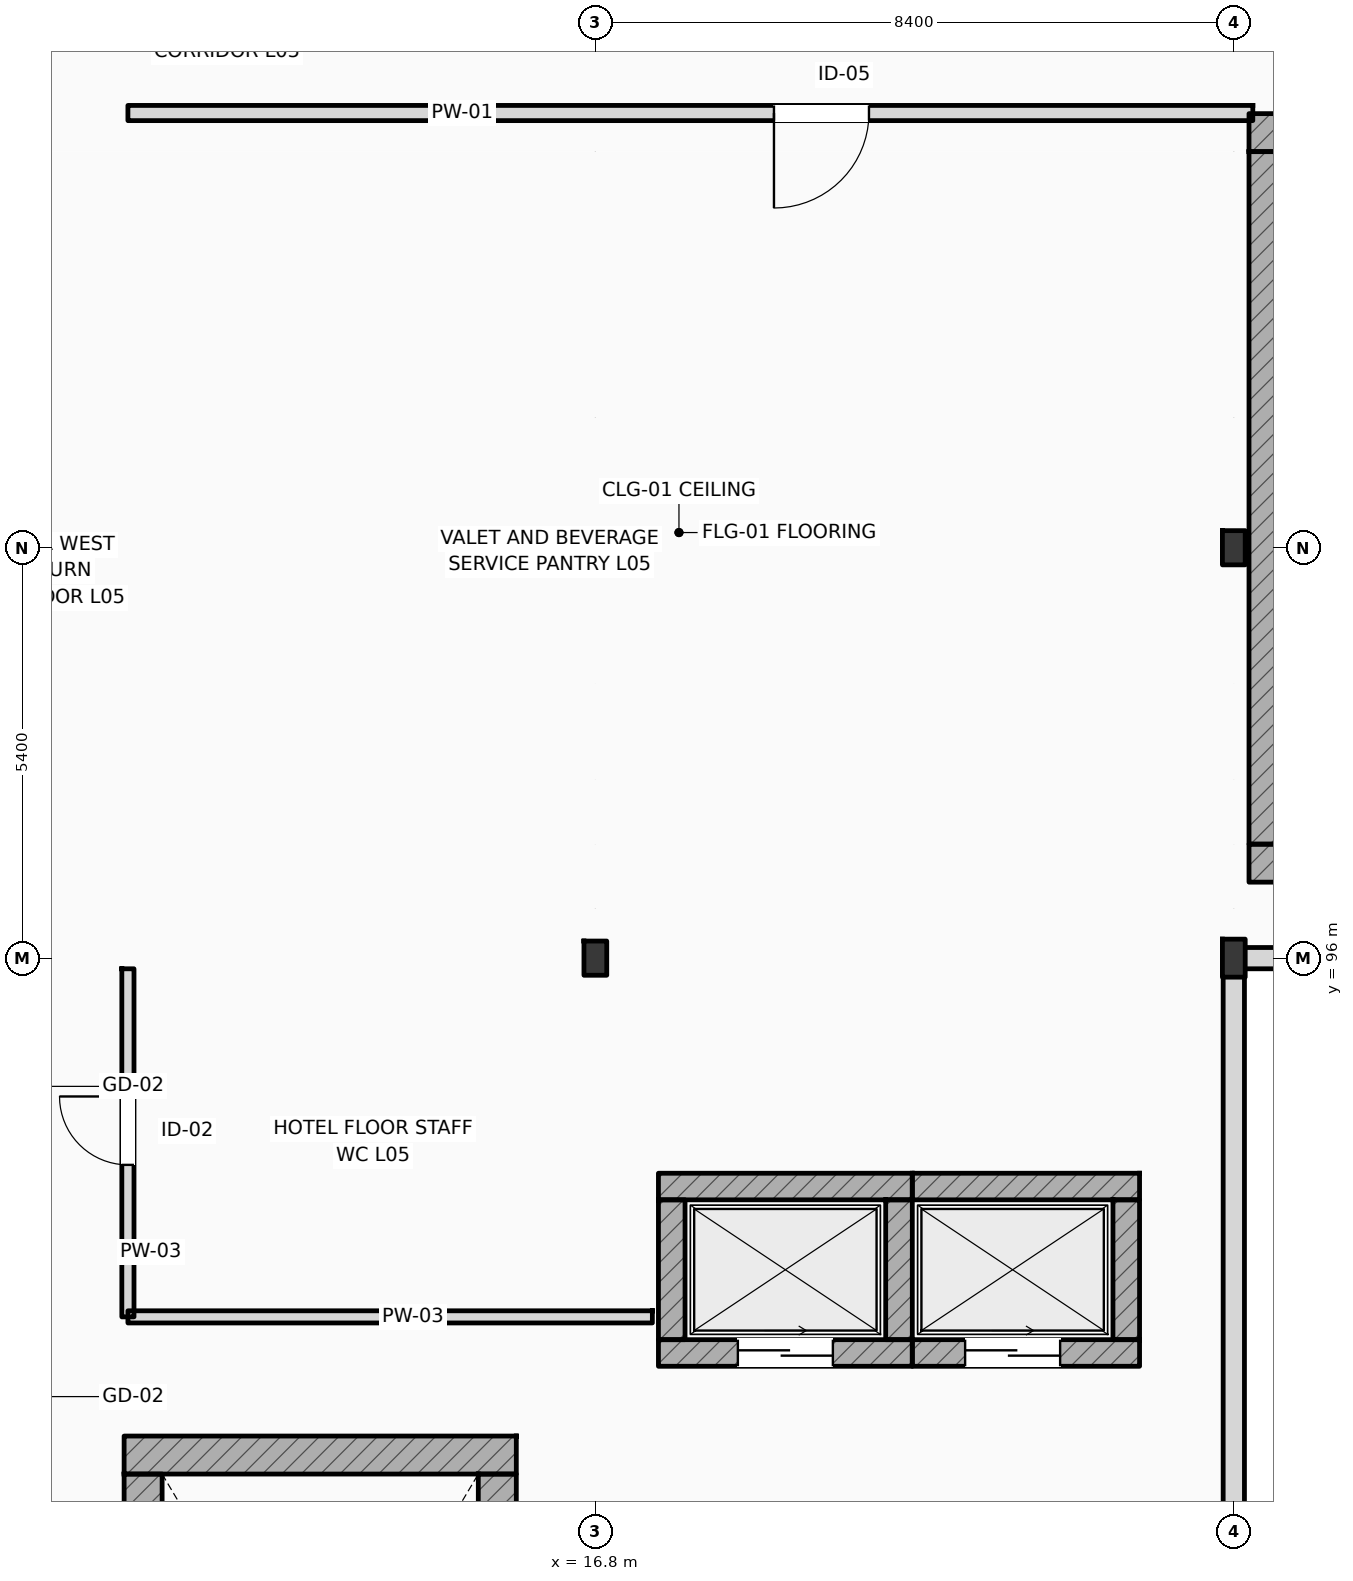
"""IFC4 building model, lengths in metres.
Left out: names, types, materials, properties, quantities, classifications, styles, units other than length and angle.
Written with IfcOpenShell. Run it as: python <this file> out.ifc"""

import sys

from ifc_helpers import new_model, si_unit, direction, frame, frame_2d, origin, origin_2d, place, context, subcontext, project, spatial, rectangle, i_section, extrude, element, fill, save


model = new_model("IFC4")
c1 = context("Model", 3, precision=1e-05, world=origin(), true_north=direction((0.0, 1.0)))
c2 = subcontext(c1, "Body", "Model", "MODEL_VIEW")
j1 = project(units=[si_unit("LENGTHUNIT", "METRE"), si_unit("PLANEANGLEUNIT", "RADIAN")], contexts=[c1])
p1 = place(None, origin())
s1 = spatial("IfcSite", under=j1, at=p1, CompositionType="ELEMENT")
p2 = place(p1, origin())
s2 = spatial("IfcBuilding", under=s1, at=p2, CompositionType="ELEMENT")
p3 = place(p2, frame((0.0, 0.0, 24.6)))
s3 = spatial("IfcBuildingStorey", under=s2, at=p3, CompositionType="ELEMENT", Elevation=24.6)
p4 = place(p3, frame((16.8, 96.0, 0.0), z_axis=(0.0, 0.0, 1.0), x_axis=(1.0, 0.0, 0.0)))
e1 = element("IfcColumn", 1, at=p4, inside=s3, PredefinedType="COLUMN", context=c2, shape_type="SweptSolid", body=[
    extrude(i_section(OverallWidth=0.3, OverallDepth=0.45, WebThickness=0.014, FlangeThickness=0.026, FilletRadius=0.027, at=origin_2d()), origin(), (0.0, 0.0, 1.0), 3.6),
])
p5 = place(p3, frame((25.2, 96.0, 0.0), z_axis=(0.0, 0.0, 1.0), x_axis=(1.0, 0.0, 0.0)))
e2 = element("IfcColumn", 2, at=p5, inside=s3, PredefinedType="COLUMN", context=c2, shape_type="SweptSolid", body=[
    extrude(i_section(OverallWidth=0.3, OverallDepth=0.5, WebThickness=0.014, FlangeThickness=0.028, FilletRadius=0.027, at=origin_2d()), origin(), (0.0, 0.0, 1.0), 3.6),
])
for number, where, z_axis, x_axis in (
    (3, (16.8, 101.4, 0.0), (0.0, 0.0, 1.0), (1.0, 0.0, 0.0)),
    (4, (25.2, 101.4, 0.0), (0.0, 0.0, 1.0), (1.0, 0.0, 0.0)),
):
    element("IfcColumn", number, at=place(p3, frame(where, z_axis=z_axis, x_axis=x_axis)), inside=s3, PredefinedType="COLUMN", context=c2, shape_type="SweptSolid", body=[
        extrude(i_section(OverallWidth=0.3, OverallDepth=0.45, WebThickness=0.014, FlangeThickness=0.026, FilletRadius=0.027, at=origin_2d()), origin(), (0.0, 0.0, 1.0), 3.6),
    ])
p6 = place(p3, frame((10.6, 89.462, 0.0), z_axis=(0.0, 0.0, 1.0), x_axis=(1.0, 0.0, 0.0)))
e5 = element("IfcWall", 5, at=p6, inside=s3, PredefinedType="SHEAR", context=c2, shape_type="SweptSolid", body=[
    extrude(rectangle(XDim=5.16, YDim=0.5, at=frame_2d((2.58, 0.0))), origin(), (0.0, 0.0, 1.0), 3.6),
])
p7 = place(p3, frame((10.85, 80.1, 0.0), z_axis=(0.0, 0.0, 1.0), x_axis=(0.0, 1.0, 0.0)))
e6 = element("IfcWall", 6, at=p7, inside=s3, PredefinedType="SHEAR", context=c2, shape_type="SweptSolid", body=[
    extrude(rectangle(XDim=9.112, YDim=0.5, at=frame_2d((4.556, 0.0))), origin(), (0.0, 0.0, 1.0), 3.6),
])
p8 = place(p3, frame((15.51, 80.1, 0.0), z_axis=(0.0, 0.0, 1.0), x_axis=(0.0, 1.0, 0.0)))
e7 = element("IfcWall", 7, at=p8, inside=s3, PredefinedType="SHEAR", context=c2, shape_type="SweptSolid", body=[
    extrude(rectangle(XDim=9.112, YDim=0.5, at=frame_2d((4.556, 0.0))), origin(), (0.0, 0.0, 1.0), 3.6),
])
p9 = place(p8, frame((0.44, 0.0, 0.0)))
e8 = element("IfcOpeningElement", 8, at=p9, cuts=e7, PredefinedType="OPENING", context=c2, shape_type="SweptSolid", body=[
    extrude(rectangle(XDim=1.1, YDim=2.2, at=frame_2d((0.55, 1.1))), frame((0.0, 0.26, 0.0), z_axis=(0.0, -1.0, 0.0), x_axis=(1.0, 0.0, 0.0)), (0.0, 0.0, 1.0), 0.52),
])
for number, where, z_axis, x_axis in (
    (9, (25.4, 106.862, 0.0), (0.0, 0.0, 1.0), (1.0, 0.0, 0.0)),
    (10, (25.4, 97.25, 0.0), (0.0, 0.0, 1.0), (1.0, 0.0, 0.0)),
):
    element("IfcWall", number, at=place(p3, frame(where, z_axis=z_axis, x_axis=x_axis)), inside=s3, PredefinedType="SHEAR", context=c2, shape_type="SweptSolid", body=[
        extrude(rectangle(XDim=5.16, YDim=0.5, at=frame_2d((2.58, 0.0))), origin(), (0.0, 0.0, 1.0), 3.6),
    ])
p10 = place(p3, frame((25.65, 97.5, 0.0), z_axis=(0.0, 0.0, 1.0), x_axis=(0.0, 1.0, 0.0)))
e11 = element("IfcWall", 11, at=p10, inside=s3, PredefinedType="SHEAR", context=c2, shape_type="SweptSolid", body=[
    extrude(rectangle(XDim=9.112, YDim=0.5, at=frame_2d((4.556, 0.0))), origin(), (0.0, 0.0, 1.0), 3.6),
])
p11 = place(p3, frame((25.2, 96.0, 0.0), z_axis=(0.0, 0.0, 1.0), x_axis=(1.0, 0.0, 0.0)))
e12 = element("IfcWall", 12, at=p11, inside=s3, PredefinedType="STANDARD", context=c2, shape_type="SweptSolid", body=[
    extrude(rectangle(XDim=94.8, YDim=0.28, at=frame_2d((47.4, 0.0))), origin(), (0.0, 0.0, 1.0), 2.78),
])
p12 = place(p11, frame((16.539, 0.0, 0.9)))
e13 = element("IfcOpeningElement", 13, at=p12, cuts=e12, PredefinedType="OPENING", context=c2, shape_type="SweptSolid", body=[
    extrude(rectangle(XDim=1.75, YDim=1.7, at=frame_2d((0.875, 0.85))), frame((0.0, 0.15, 0.0), z_axis=(0.0, -1.0, 0.0), x_axis=(1.0, 0.0, 0.0)), (0.0, 0.0, 1.0), 0.3),
])
p13 = place(p11, frame((20.367, 0.0, 0.9)))
e14 = element("IfcOpeningElement", 14, at=p13, cuts=e12, PredefinedType="OPENING", context=c2, shape_type="SweptSolid", body=[
    extrude(rectangle(XDim=2.0, YDim=1.7, at=frame_2d((1.0, 0.85))), frame((0.0, 0.15, 0.0), z_axis=(0.0, -1.0, 0.0), x_axis=(1.0, 0.0, 0.0)), (0.0, 0.0, 1.0), 0.3),
])
p14 = place(p11, frame((24.326, 0.0, 0.9)))
e15 = element("IfcOpeningElement", 15, at=p14, cuts=e12, PredefinedType="OPENING", context=c2, shape_type="SweptSolid", body=[
    extrude(rectangle(XDim=2.3, YDim=1.7, at=frame_2d((1.15, 0.85))), frame((0.0, 0.15, 0.0), z_axis=(0.0, -1.0, 0.0), x_axis=(1.0, 0.0, 0.0)), (0.0, 0.0, 1.0), 0.3),
])
p15 = place(p11, frame((27.684, 0.0, 0.9)))
e16 = element("IfcOpeningElement", 16, at=p15, cuts=e12, PredefinedType="OPENING", context=c2, shape_type="SweptSolid", body=[
    extrude(rectangle(XDim=2.6, YDim=1.7, at=frame_2d((1.3, 0.85))), frame((0.0, 0.15, 0.0), z_axis=(0.0, -1.0, 0.0), x_axis=(1.0, 0.0, 0.0)), (0.0, 0.0, 1.0), 0.3),
])
p16 = place(p11, frame((32.083, 0.0, 0.9)))
e17 = element("IfcOpeningElement", 17, at=p16, cuts=e12, PredefinedType="OPENING", context=c2, shape_type="SweptSolid", body=[
    extrude(rectangle(XDim=2.419, YDim=1.7, at=frame_2d((1.209, 0.85))), frame((0.0, 0.15, 0.0), z_axis=(0.0, -1.0, 0.0), x_axis=(1.0, 0.0, 0.0)), (0.0, 0.0, 1.0), 0.3),
])
p17 = place(p11, frame((35.322, 0.0, 0.9)))
e18 = element("IfcOpeningElement", 18, at=p17, cuts=e12, PredefinedType="OPENING", context=c2, shape_type="SweptSolid", body=[
    extrude(rectangle(XDim=2.868, YDim=1.7, at=frame_2d((1.434, 0.85))), frame((0.0, 0.15, 0.0), z_axis=(0.0, -1.0, 0.0), x_axis=(1.0, 0.0, 0.0)), (0.0, 0.0, 1.0), 0.3),
])
p18 = place(p11, frame((56.015, 0.0, 0.9)))
e19 = element("IfcOpeningElement", 19, at=p18, cuts=e12, PredefinedType="OPENING", context=c2, shape_type="SweptSolid", body=[
    extrude(rectangle(XDim=1.2, YDim=1.7, at=frame_2d((0.6, 0.85))), frame((0.0, 0.15, 0.0), z_axis=(0.0, -1.0, 0.0), x_axis=(1.0, 0.0, 0.0)), (0.0, 0.0, 1.0), 0.3),
])
p19 = place(p11, frame((59.888, 0.0, 0.9)))
e20 = element("IfcOpeningElement", 20, at=p19, cuts=e12, PredefinedType="OPENING", context=c2, shape_type="SweptSolid", body=[
    extrude(rectangle(XDim=1.35, YDim=1.7, at=frame_2d((0.675, 0.85))), frame((0.0, 0.15, 0.0), z_axis=(0.0, -1.0, 0.0), x_axis=(1.0, 0.0, 0.0)), (0.0, 0.0, 1.0), 0.3),
])
p20 = place(p11, frame((63.799, 0.0, 0.9)))
e21 = element("IfcOpeningElement", 21, at=p20, cuts=e12, PredefinedType="OPENING", context=c2, shape_type="SweptSolid", body=[
    extrude(rectangle(XDim=1.5, YDim=1.7, at=frame_2d((0.75, 0.85))), frame((0.0, 0.15, 0.0), z_axis=(0.0, -1.0, 0.0), x_axis=(1.0, 0.0, 0.0)), (0.0, 0.0, 1.0), 0.3),
])
p21 = place(p11, frame((67.709, 0.0, 0.9)))
e22 = element("IfcOpeningElement", 22, at=p21, cuts=e12, PredefinedType="OPENING", context=c2, shape_type="SweptSolid", body=[
    extrude(rectangle(XDim=1.65, YDim=1.7, at=frame_2d((0.825, 0.85))), frame((0.0, 0.15, 0.0), z_axis=(0.0, -1.0, 0.0), x_axis=(1.0, 0.0, 0.0)), (0.0, 0.0, 1.0), 0.3),
])
p22 = place(p11, frame((71.618, 0.0, 0.9)))
e23 = element("IfcOpeningElement", 23, at=p22, cuts=e12, PredefinedType="OPENING", context=c2, shape_type="SweptSolid", body=[
    extrude(rectangle(XDim=1.8, YDim=1.7, at=frame_2d((0.9, 0.85))), frame((0.0, 0.15, 0.0), z_axis=(0.0, -1.0, 0.0), x_axis=(1.0, 0.0, 0.0)), (0.0, 0.0, 1.0), 0.3),
])
p23 = place(p11, frame((75.129, 0.0, 0.9)))
e24 = element("IfcOpeningElement", 24, at=p23, cuts=e12, PredefinedType="OPENING", context=c2, shape_type="SweptSolid", body=[
    extrude(rectangle(XDim=1.95, YDim=1.7, at=frame_2d((0.975, 0.85))), frame((0.0, 0.15, 0.0), z_axis=(0.0, -1.0, 0.0), x_axis=(1.0, 0.0, 0.0)), (0.0, 0.0, 1.0), 0.3),
])
p24 = place(p11, frame((79.439, 0.0, 0.9)))
e25 = element("IfcOpeningElement", 25, at=p24, cuts=e12, PredefinedType="OPENING", context=c2, shape_type="SweptSolid", body=[
    extrude(rectangle(XDim=2.1, YDim=1.7, at=frame_2d((1.05, 0.85))), frame((0.0, 0.15, 0.0), z_axis=(0.0, -1.0, 0.0), x_axis=(1.0, 0.0, 0.0)), (0.0, 0.0, 1.0), 0.3),
])
p25 = place(p11, frame((83.349, 0.0, 0.9)))
e26 = element("IfcOpeningElement", 26, at=p25, cuts=e12, PredefinedType="OPENING", context=c2, shape_type="SweptSolid", body=[
    extrude(rectangle(XDim=2.25, YDim=1.7, at=frame_2d((1.125, 0.85))), frame((0.0, 0.15, 0.0), z_axis=(0.0, -1.0, 0.0), x_axis=(1.0, 0.0, 0.0)), (0.0, 0.0, 1.0), 0.3),
])
p26 = place(p11, frame((87.258, 0.0, 0.9)))
e27 = element("IfcOpeningElement", 27, at=p26, cuts=e12, PredefinedType="OPENING", context=c2, shape_type="SweptSolid", body=[
    extrude(rectangle(XDim=2.4, YDim=1.7, at=frame_2d((1.2, 0.85))), frame((0.0, 0.15, 0.0), z_axis=(0.0, -1.0, 0.0), x_axis=(1.0, 0.0, 0.0)), (0.0, 0.0, 1.0), 0.3),
])
p27 = place(p11, frame((91.204, 0.0, 0.9)))
e28 = element("IfcOpeningElement", 28, at=p27, cuts=e12, PredefinedType="OPENING", context=c2, shape_type="SweptSolid", body=[
    extrude(rectangle(XDim=2.55, YDim=1.7, at=frame_2d((1.275, 0.85))), frame((0.0, 0.15, 0.0), z_axis=(0.0, -1.0, 0.0), x_axis=(1.0, 0.0, 0.0)), (0.0, 0.0, 1.0), 0.3),
])
p28 = place(p3, frame((25.2, 79.5, 0.0), z_axis=(0.0, 0.0, 1.0), x_axis=(0.0, 1.0, 0.0)))
e29 = element("IfcWall", 29, at=p28, inside=s3, PredefinedType="STANDARD", context=c2, shape_type="SweptSolid", body=[
    extrude(rectangle(XDim=16.5, YDim=0.28, at=frame_2d((8.25, 0.0))), origin(), (0.0, 0.0, 1.0), 2.93),
])
p29 = place(p3, frame((17.63, 92.995, 0.0), z_axis=(0.0, 0.0, 1.0), x_axis=(1.0, 0.0, 0.0)))
e30 = element("IfcWall", 30, at=p29, inside=s3, PredefinedType="SHEAR", context=c2, shape_type="SweptSolid", body=[
    extrude(rectangle(XDim=3.34, YDim=0.35, at=frame_2d((1.67, 0.0))), origin(), (0.0, 0.0, 1.0), 3.34),
])
p30 = place(p3, frame((17.63, 90.805, 0.0), z_axis=(0.0, 0.0, 1.0), x_axis=(1.0, 0.0, 0.0)))
e31 = element("IfcWall", 31, at=p30, inside=s3, PredefinedType="SHEAR", context=c2, shape_type="SweptSolid", body=[
    extrude(rectangle(XDim=3.34, YDim=0.35, at=frame_2d((1.67, 0.0))), origin(), (0.0, 0.0, 1.0), 3.34),
])
p31 = place(p30, frame((1.045, 0.0, 0.0)))
e32 = element("IfcOpeningElement", 32, at=p31, cuts=e31, PredefinedType="OPENING", context=c2, shape_type="SweptSolid", body=[
    extrude(rectangle(XDim=1.25, YDim=2.25, at=frame_2d((0.625, 1.125))), frame((0.0, 0.185, 0.0), z_axis=(0.0, -1.0, 0.0), x_axis=(1.0, 0.0, 0.0)), (0.0, 0.0, 1.0), 0.37),
])
for number, where, z_axis, x_axis in (
    (33, (17.805, 90.98, 0.0), (0.0, 0.0, 1.0), (0.0, 1.0, 0.0)),
    (34, (20.795, 90.98, 0.0), (0.0, 0.0, 1.0), (0.0, 1.0, 0.0)),
):
    element("IfcWall", number, at=place(p3, frame(where, z_axis=z_axis, x_axis=x_axis)), inside=s3, PredefinedType="SHEAR", context=c2, shape_type="SweptSolid", body=[
        extrude(rectangle(XDim=1.84, YDim=0.35, at=frame_2d((0.92, 0.0))), origin(), (0.0, 0.0, 1.0), 3.34),
    ])
p32 = place(p3, frame((20.97, 92.995, 0.0), z_axis=(0.0, 0.0, 1.0), x_axis=(1.0, 0.0, 0.0)))
e35 = element("IfcWall", 35, at=p32, inside=s3, PredefinedType="SHEAR", context=c2, shape_type="SweptSolid", body=[
    extrude(rectangle(XDim=2.99, YDim=0.35, at=frame_2d((1.495, 0.0))), origin(), (0.0, 0.0, 1.0), 3.34),
])
p33 = place(p3, frame((20.97, 90.805, 0.0), z_axis=(0.0, 0.0, 1.0), x_axis=(1.0, 0.0, 0.0)))
e36 = element("IfcWall", 36, at=p33, inside=s3, PredefinedType="SHEAR", context=c2, shape_type="SweptSolid", body=[
    extrude(rectangle(XDim=2.99, YDim=0.35, at=frame_2d((1.495, 0.0))), origin(), (0.0, 0.0, 1.0), 3.34),
])
p34 = place(p33, frame((0.695, 0.0, 0.0)))
e37 = element("IfcOpeningElement", 37, at=p34, cuts=e36, PredefinedType="OPENING", context=c2, shape_type="SweptSolid", body=[
    extrude(rectangle(XDim=1.25, YDim=2.25, at=frame_2d((0.625, 1.125))), frame((0.0, 0.185, 0.0), z_axis=(0.0, -1.0, 0.0), x_axis=(1.0, 0.0, 0.0)), (0.0, 0.0, 1.0), 0.37),
])
p35 = place(p3, frame((23.785, 90.98, 0.0), z_axis=(0.0, 0.0, 1.0), x_axis=(0.0, 1.0, 0.0)))
e38 = element("IfcWall", 38, at=p35, inside=s3, PredefinedType="SHEAR", context=c2, shape_type="SweptSolid", body=[
    extrude(rectangle(XDim=1.84, YDim=0.35, at=frame_2d((0.92, 0.0))), origin(), (0.0, 0.0, 1.0), 3.34),
])
p36 = place(p3, frame((10.65, 107.12, 0.0), z_axis=(0.0, 0.0, 1.0), x_axis=(1.0, 0.0, 0.0)))
e39 = element("IfcWall", 39, at=p36, inside=s3, PredefinedType="PARTITIONING", context=c2, shape_type="SweptSolid", body=[
    extrude(rectangle(XDim=14.8, YDim=0.2, at=frame_2d((7.4, 0.0))), origin(), (0.0, 0.0, 1.0), 3.34),
])
p37 = place(p36, frame((8.5, 0.0, 0.0)))
e40 = element("IfcOpeningElement", 40, at=p37, cuts=e39, PredefinedType="OPENING", context=c2, shape_type="SweptSolid", body=[
    extrude(rectangle(XDim=1.25, YDim=2.15, at=frame_2d((0.625, 1.075))), frame((0.0, 0.11, 0.0), z_axis=(0.0, -1.0, 0.0), x_axis=(1.0, 0.0, 0.0)), (0.0, 0.0, 1.0), 0.22),
])
p38 = place(p3, frame((10.65, 91.28, 0.0), z_axis=(0.0, 0.0, 1.0), x_axis=(0.0, 1.0, 0.0)))
e41 = element("IfcWall", 41, at=p38, inside=s3, PredefinedType="PARTITIONING", context=c2, shape_type="SweptSolid", body=[
    extrude(rectangle(XDim=4.58, YDim=0.16, at=frame_2d((2.29, 0.0))), origin(), (0.0, 0.0, 1.0), 3.34),
])
p39 = place(p38, frame((2.0, 0.0, 0.0)))
e42 = element("IfcOpeningElement", 42, at=p39, cuts=e41, PredefinedType="OPENING", context=c2, shape_type="SweptSolid", body=[
    extrude(rectangle(XDim=0.9, YDim=2.1, at=frame_2d((0.45, 1.05))), frame((0.0, 0.09, 0.0), z_axis=(0.0, -1.0, 0.0), x_axis=(1.0, 0.0, 0.0)), (0.0, 0.0, 1.0), 0.18),
])
p40 = place(p3, frame((10.65, 91.28, 0.0), z_axis=(0.0, 0.0, 1.0), x_axis=(1.0, 0.0, 0.0)))
e43 = element("IfcWall", 43, at=p40, inside=s3, PredefinedType="PARTITIONING", context=c2, shape_type="SweptSolid", body=[
    extrude(rectangle(XDim=6.9, YDim=0.16, at=frame_2d((3.45, 0.0))), origin(), (0.0, 0.0, 1.0), 3.34),
])
p41 = place(p31, origin())
e44 = element("IfcDoor", 44, at=p41, inside=s3, OperationType="SLIDING_TO_LEFT", PredefinedType="DOOR", context=c2, shape_type="SweptSolid", body=[
    extrude(rectangle(XDim=1.25, YDim=2.25, at=frame_2d((0.625, 1.125))), frame((0.0, 0.025, 0.0), z_axis=(0.0, -1.0, 0.0), x_axis=(1.0, 0.0, 0.0)), (0.0, 0.0, 1.0), 0.05),
])
fill(e32, e44)
p42 = place(p34, origin())
e45 = element("IfcDoor", 45, at=p42, inside=s3, OperationType="SLIDING_TO_LEFT", PredefinedType="DOOR", context=c2, shape_type="SweptSolid", body=[
    extrude(rectangle(XDim=1.25, YDim=2.25, at=frame_2d((0.625, 1.125))), frame((0.0, 0.025, 0.0), z_axis=(0.0, -1.0, 0.0), x_axis=(1.0, 0.0, 0.0)), (0.0, 0.0, 1.0), 0.05),
])
fill(e37, e45)
p43 = place(p39, origin())
e46 = element("IfcDoor", 46, at=p43, inside=s3, OperationType="SINGLE_SWING_RIGHT", PredefinedType="DOOR", context=c2, shape_type="SweptSolid", body=[
    extrude(rectangle(XDim=0.9, YDim=2.1, at=frame_2d((0.45, 1.05))), frame((0.0, 0.025, 0.0), z_axis=(0.0, -1.0, 0.0), x_axis=(1.0, 0.0, 0.0)), (0.0, 0.0, 1.0), 0.05),
])
fill(e42, e46)
p44 = place(p37, frame((1.25, 0.0, 0.0), z_axis=(0.0, 0.0, 1.0), x_axis=(-1.0, 0.0, 0.0)))
e47 = element("IfcDoor", 47, at=p44, inside=s3, OperationType="SINGLE_SWING_LEFT", PredefinedType="DOOR", context=c2, shape_type="SweptSolid", body=[
    extrude(rectangle(XDim=1.25, YDim=2.15, at=frame_2d((0.625, 1.075))), frame((0.0, 0.025, 0.0), z_axis=(0.0, -1.0, 0.0), x_axis=(1.0, 0.0, 0.0)), (0.0, 0.0, 1.0), 0.05),
])
fill(e40, e47)
save(model, sys.argv[1])
